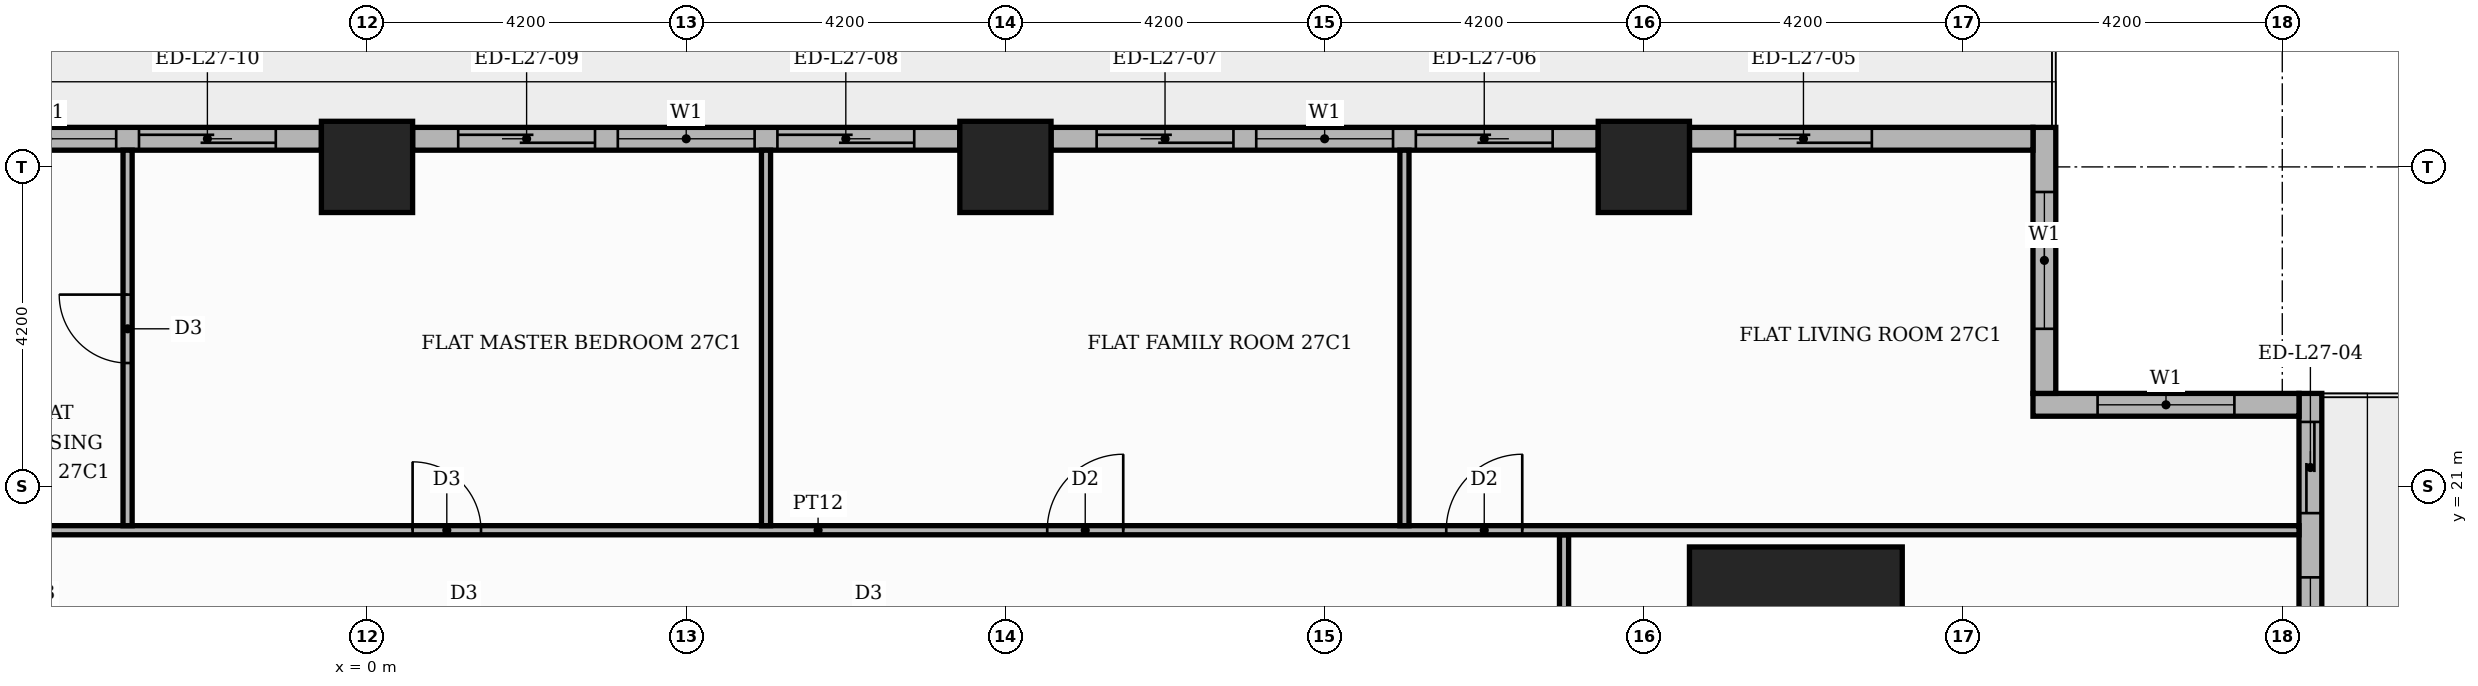
"""IFC4 building model, lengths in metres.
Left out: names, types, materials, properties, quantities, classifications, styles, units other than length and angle.
Written with IfcOpenShell. Run it as: python <this file> out.ifc"""

import sys

from ifc_helpers import new_model, si_unit, direction, frame, frame_2d, origin, origin_2d, place, context, subcontext, project, spatial, rectangle, extrude, element, fill, save


model = new_model("IFC4")
c1 = context("Model", 3, precision=1e-05, world=origin(), true_north=direction((0.0, 1.0)))
c2 = subcontext(c1, "Body", "Model", "MODEL_VIEW")
j1 = project(units=[si_unit("LENGTHUNIT", "METRE"), si_unit("PLANEANGLEUNIT", "RADIAN")], contexts=[c1])
p1 = place(None, origin())
s1 = spatial("IfcSite", under=j1, at=p1, CompositionType="ELEMENT")
p2 = place(p1, origin())
s2 = spatial("IfcBuilding", under=s1, at=p2, CompositionType="ELEMENT")
p3 = place(p2, frame((0.0, 0.0, 114.3)))
s3 = spatial("IfcBuildingStorey", under=s2, at=p3, CompositionType="ELEMENT", Elevation=114.3)
p4 = place(p3, frame((18.8, 18.8, 0.0), z_axis=(0.0, 0.0, 1.0), x_axis=(1.0, 0.0, 0.0)))
e1 = element("IfcColumn", 1, at=p4, inside=s3, PredefinedType="COLUMN", context=c2, shape_type="SweptSolid", body=[
    extrude(rectangle(XDim=2.8, YDim=2.8, at=origin_2d()), origin(), (0.0, 0.0, 1.0), 3.9),
])
for number, where, z_axis, x_axis in (
    (2, (0.0, 25.2, 0.0), (0.0, 0.0, 1.0), (1.0, 0.0, 0.0)),
    (3, (8.4, 25.2, 0.0), (0.0, 0.0, 1.0), (1.0, 0.0, 0.0)),
    (4, (16.8, 25.2, 0.0), (0.0, 0.0, 1.0), (1.0, 0.0, 0.0)),
):
    element("IfcColumn", number, at=place(p3, frame(where, z_axis=z_axis, x_axis=x_axis)), inside=s3, PredefinedType="COLUMN", context=c2, shape_type="SweptSolid", body=[
        extrude(rectangle(XDim=1.2, YDim=1.2, at=origin_2d()), origin(), (0.0, 0.0, 1.0), 3.9),
    ])
p5 = place(p3, frame((25.57, 17.4, 0.0), z_axis=(0.0, 0.0, 1.0), x_axis=(0.0, 1.0, 0.0)))
e5 = element("IfcWall", 5, at=p5, inside=s3, PredefinedType="STANDARD", context=c2, shape_type="SweptSolid", body=[
    extrude(rectangle(XDim=4.82, YDim=0.3, at=frame_2d((2.41, 0.0))), origin(), (0.0, 0.0, 1.0), 3.48),
])
p6 = place(p5, frame((0.6, 0.0, 0.9)))
e6 = element("IfcOpeningElement", 6, at=p6, cuts=e5, PredefinedType="OPENING", context=c2, shape_type="SweptSolid", body=[
    extrude(rectangle(XDim=1.8, YDim=2.1, at=frame_2d((0.9, 1.05))), frame((0.0, 0.16, 0.0), z_axis=(0.0, -1.0, 0.0), x_axis=(1.0, 0.0, 0.0)), (0.0, 0.0, 1.0), 0.32),
])
p7 = place(p5, frame((3.245, 0.0, 0.0)))
e7 = element("IfcOpeningElement", 7, at=p7, cuts=e5, PredefinedType="OPENING", context=c2, shape_type="SweptSolid", body=[
    extrude(rectangle(XDim=1.2, YDim=2.4, at=frame_2d((0.6, 1.2))), frame((0.0, 0.16, 0.0), z_axis=(0.0, -1.0, 0.0), x_axis=(1.0, 0.0, 0.0)), (0.0, 0.0, 1.0), 0.32),
])
p8 = place(p3, frame((25.42, 22.07, 0.0), z_axis=(0.0, 0.0, 1.0), x_axis=(-1.0, 0.0, 0.0)))
e8 = element("IfcWall", 8, at=p8, inside=s3, PredefinedType="STANDARD", context=c2, shape_type="SweptSolid", body=[
    extrude(rectangle(XDim=3.5, YDim=0.3, at=frame_2d((1.75, 0.0))), origin(), (0.0, 0.0, 1.0), 3.48),
])
p9 = place(p8, frame((0.85, 0.0, 0.9)))
e9 = element("IfcOpeningElement", 9, at=p9, cuts=e8, PredefinedType="OPENING", context=c2, shape_type="SweptSolid", body=[
    extrude(rectangle(XDim=1.8, YDim=2.1, at=frame_2d((0.9, 1.05))), frame((0.0, 0.16, 0.0), z_axis=(0.0, -1.0, 0.0), x_axis=(1.0, 0.0, 0.0)), (0.0, 0.0, 1.0), 0.32),
])
p10 = place(p3, frame((22.07, 22.22, 0.0), z_axis=(0.0, 0.0, 1.0), x_axis=(0.0, 1.0, 0.0)))
e10 = element("IfcWall", 10, at=p10, inside=s3, PredefinedType="STANDARD", context=c2, shape_type="SweptSolid", body=[
    extrude(rectangle(XDim=3.5, YDim=0.3, at=frame_2d((1.75, 0.0))), origin(), (0.0, 0.0, 1.0), 3.48),
])
p11 = place(p10, frame((0.85, 0.0, 0.9)))
e11 = element("IfcOpeningElement", 11, at=p11, cuts=e10, PredefinedType="OPENING", context=c2, shape_type="SweptSolid", body=[
    extrude(rectangle(XDim=1.8, YDim=2.1, at=frame_2d((0.9, 1.05))), frame((0.0, 0.16, 0.0), z_axis=(0.0, -1.0, 0.0), x_axis=(1.0, 0.0, 0.0)), (0.0, 0.0, 1.0), 0.32),
])
p12 = place(p3, frame((21.92, 25.57, 0.0), z_axis=(0.0, 0.0, 1.0), x_axis=(-1.0, 0.0, 0.0)))
e12 = element("IfcWall", 12, at=p12, inside=s3, PredefinedType="STANDARD", context=c2, shape_type="SweptSolid", body=[
    extrude(rectangle(XDim=4.52, YDim=0.3, at=frame_2d((2.26, 0.0))), origin(), (0.0, 0.0, 1.0), 3.48),
])
p13 = place(p12, frame((2.12, 0.0, 0.0)))
e13 = element("IfcOpeningElement", 13, at=p13, cuts=e12, PredefinedType="OPENING", context=c2, shape_type="SweptSolid", body=[
    extrude(rectangle(XDim=1.8, YDim=2.4, at=frame_2d((0.9, 1.2))), frame((0.0, 0.16, 0.0), z_axis=(0.0, -1.0, 0.0), x_axis=(1.0, 0.0, 0.0)), (0.0, 0.0, 1.0), 0.32),
])
p14 = place(p3, frame((16.2, 25.57, 0.0), z_axis=(0.0, 0.0, 1.0), x_axis=(-1.0, 0.0, 0.0)))
e14 = element("IfcWall", 14, at=p14, inside=s3, PredefinedType="STANDARD", context=c2, shape_type="SweptSolid", body=[
    extrude(rectangle(XDim=7.2, YDim=0.3, at=frame_2d((3.6, 0.0))), origin(), (0.0, 0.0, 1.0), 3.48),
])
p15 = place(p14, frame((0.6, 0.0, 0.0)))
e15 = element("IfcOpeningElement", 15, at=p15, cuts=e14, PredefinedType="OPENING", context=c2, shape_type="SweptSolid", body=[
    extrude(rectangle(XDim=1.8, YDim=2.4, at=frame_2d((0.9, 1.2))), frame((0.0, 0.16, 0.0), z_axis=(0.0, -1.0, 0.0), x_axis=(1.0, 0.0, 0.0)), (0.0, 0.0, 1.0), 0.32),
])
p16 = place(p14, frame((2.7, 0.0, 0.9)))
e16 = element("IfcOpeningElement", 16, at=p16, cuts=e14, PredefinedType="OPENING", context=c2, shape_type="SweptSolid", body=[
    extrude(rectangle(XDim=1.8, YDim=2.1, at=frame_2d((0.9, 1.05))), frame((0.0, 0.16, 0.0), z_axis=(0.0, -1.0, 0.0), x_axis=(1.0, 0.0, 0.0)), (0.0, 0.0, 1.0), 0.32),
])
p17 = place(p14, frame((4.8, 0.0, 0.0)))
e17 = element("IfcOpeningElement", 17, at=p17, cuts=e14, PredefinedType="OPENING", context=c2, shape_type="SweptSolid", body=[
    extrude(rectangle(XDim=1.8, YDim=2.4, at=frame_2d((0.9, 1.2))), frame((0.0, 0.16, 0.0), z_axis=(0.0, -1.0, 0.0), x_axis=(1.0, 0.0, 0.0)), (0.0, 0.0, 1.0), 0.32),
])
p18 = place(p3, frame((7.8, 25.57, 0.0), z_axis=(0.0, 0.0, 1.0), x_axis=(-1.0, 0.0, 0.0)))
e18 = element("IfcWall", 18, at=p18, inside=s3, PredefinedType="STANDARD", context=c2, shape_type="SweptSolid", body=[
    extrude(rectangle(XDim=7.2, YDim=0.3, at=frame_2d((3.6, 0.0))), origin(), (0.0, 0.0, 1.0), 3.48),
])
p19 = place(p18, frame((0.6, 0.0, 0.0)))
e19 = element("IfcOpeningElement", 19, at=p19, cuts=e18, PredefinedType="OPENING", context=c2, shape_type="SweptSolid", body=[
    extrude(rectangle(XDim=1.8, YDim=2.4, at=frame_2d((0.9, 1.2))), frame((0.0, 0.16, 0.0), z_axis=(0.0, -1.0, 0.0), x_axis=(1.0, 0.0, 0.0)), (0.0, 0.0, 1.0), 0.32),
])
p20 = place(p18, frame((2.7, 0.0, 0.9)))
e20 = element("IfcOpeningElement", 20, at=p20, cuts=e18, PredefinedType="OPENING", context=c2, shape_type="SweptSolid", body=[
    extrude(rectangle(XDim=1.8, YDim=2.1, at=frame_2d((0.9, 1.05))), frame((0.0, 0.16, 0.0), z_axis=(0.0, -1.0, 0.0), x_axis=(1.0, 0.0, 0.0)), (0.0, 0.0, 1.0), 0.32),
])
p21 = place(p18, frame((4.8, 0.0, 0.0)))
e21 = element("IfcOpeningElement", 21, at=p21, cuts=e18, PredefinedType="OPENING", context=c2, shape_type="SweptSolid", body=[
    extrude(rectangle(XDim=1.8, YDim=2.4, at=frame_2d((0.9, 1.2))), frame((0.0, 0.16, 0.0), z_axis=(0.0, -1.0, 0.0), x_axis=(1.0, 0.0, 0.0)), (0.0, 0.0, 1.0), 0.32),
])
p22 = place(p3, frame((-0.6, 25.57, 0.0), z_axis=(0.0, 0.0, 1.0), x_axis=(-1.0, 0.0, 0.0)))
e22 = element("IfcWall", 22, at=p22, inside=s3, PredefinedType="STANDARD", context=c2, shape_type="SweptSolid", body=[
    extrude(rectangle(XDim=7.2, YDim=0.3, at=frame_2d((3.6, 0.0))), origin(), (0.0, 0.0, 1.0), 3.48),
])
p23 = place(p22, frame((0.6, 0.0, 0.0)))
e23 = element("IfcOpeningElement", 23, at=p23, cuts=e22, PredefinedType="OPENING", context=c2, shape_type="SweptSolid", body=[
    extrude(rectangle(XDim=1.8, YDim=2.4, at=frame_2d((0.9, 1.2))), frame((0.0, 0.16, 0.0), z_axis=(0.0, -1.0, 0.0), x_axis=(1.0, 0.0, 0.0)), (0.0, 0.0, 1.0), 0.32),
])
p24 = place(p22, frame((2.7, 0.0, 0.9)))
e24 = element("IfcOpeningElement", 24, at=p24, cuts=e22, PredefinedType="OPENING", context=c2, shape_type="SweptSolid", body=[
    extrude(rectangle(XDim=1.8, YDim=2.1, at=frame_2d((0.9, 1.05))), frame((0.0, 0.16, 0.0), z_axis=(0.0, -1.0, 0.0), x_axis=(1.0, 0.0, 0.0)), (0.0, 0.0, 1.0), 0.32),
])
p25 = place(p22, frame((4.8, 0.0, 0.9)))
e25 = element("IfcOpeningElement", 25, at=p25, cuts=e22, PredefinedType="OPENING", context=c2, shape_type="SweptSolid", body=[
    extrude(rectangle(XDim=1.8, YDim=2.1, at=frame_2d((0.9, 1.05))), frame((0.0, 0.16, 0.0), z_axis=(0.0, -1.0, 0.0), x_axis=(1.0, 0.0, 0.0)), (0.0, 0.0, 1.0), 0.32),
])
p26 = place(p3, frame((15.75, 13.75, 0.0), z_axis=(0.0, 0.0, 1.0), x_axis=(0.0, 1.0, 0.0)))
e26 = element("IfcWall", 26, at=p26, inside=s3, PredefinedType="PARTITIONING", context=c2, shape_type="SweptSolid", body=[
    extrude(rectangle(XDim=6.61, YDim=0.12, at=frame_2d((3.305, 0.0))), origin(), (0.0, 0.0, 1.0), 3.48),
])
p27 = place(p26, frame((2.835, 0.0, 0.0)))
e27 = element("IfcOpeningElement", 27, at=p27, cuts=e26, PredefinedType="OPENING", context=c2, shape_type="SweptSolid", body=[
    extrude(rectangle(XDim=0.9, YDim=2.1, at=frame_2d((0.45, 1.05))), frame((0.0, 0.07, 0.0), z_axis=(0.0, -1.0, 0.0), x_axis=(1.0, 0.0, 0.0)), (0.0, 0.0, 1.0), 0.14),
])
p28 = place(p3, frame((-13.55, 20.42, 0.0), z_axis=(0.0, 0.0, 1.0), x_axis=(1.0, 0.0, 0.0)))
e28 = element("IfcWall", 28, at=p28, inside=s3, PredefinedType="PARTITIONING", context=c2, shape_type="SweptSolid", body=[
    extrude(rectangle(XDim=38.97, YDim=0.12, at=frame_2d((19.485, 0.0))), origin(), (0.0, 0.0, 1.0), 3.48),
])
p29 = place(p28, frame((27.75, 0.0, 0.0)))
e29 = element("IfcOpeningElement", 29, at=p29, cuts=e28, PredefinedType="OPENING", context=c2, shape_type="SweptSolid", body=[
    extrude(rectangle(XDim=1.0, YDim=2.1, at=frame_2d((0.5, 1.05))), frame((0.0, 0.07, 0.0), z_axis=(0.0, -1.0, 0.0), x_axis=(1.0, 0.0, 0.0)), (0.0, 0.0, 1.0), 0.14),
])
p30 = place(p28, frame((22.5, 0.0, 0.0)))
e30 = element("IfcOpeningElement", 30, at=p30, cuts=e28, PredefinedType="OPENING", context=c2, shape_type="SweptSolid", body=[
    extrude(rectangle(XDim=1.0, YDim=2.1, at=frame_2d((0.5, 1.05))), frame((0.0, 0.07, 0.0), z_axis=(0.0, -1.0, 0.0), x_axis=(1.0, 0.0, 0.0)), (0.0, 0.0, 1.0), 0.14),
])
p31 = place(p28, frame((14.15, 0.0, 0.0)))
e31 = element("IfcOpeningElement", 31, at=p31, cuts=e28, PredefinedType="OPENING", context=c2, shape_type="SweptSolid", body=[
    extrude(rectangle(XDim=0.9, YDim=2.1, at=frame_2d((0.45, 1.05))), frame((0.0, 0.07, 0.0), z_axis=(0.0, -1.0, 0.0), x_axis=(1.0, 0.0, 0.0)), (0.0, 0.0, 1.0), 0.14),
])
p32 = place(p28, frame((3.65, 0.0, 0.0)))
e32 = element("IfcOpeningElement", 32, at=p32, cuts=e28, PredefinedType="OPENING", context=c2, shape_type="SweptSolid", body=[
    extrude(rectangle(XDim=0.9, YDim=2.1, at=frame_2d((0.45, 1.05))), frame((0.0, 0.07, 0.0), z_axis=(0.0, -1.0, 0.0), x_axis=(1.0, 0.0, 0.0)), (0.0, 0.0, 1.0), 0.14),
])
p33 = place(p3, frame((-3.15, 20.48, 0.0), z_axis=(0.0, 0.0, 1.0), x_axis=(0.0, 1.0, 0.0)))
e33 = element("IfcWall", 33, at=p33, inside=s3, PredefinedType="PARTITIONING", context=c2, shape_type="SweptSolid", body=[
    extrude(rectangle(XDim=4.94, YDim=0.12, at=frame_2d((2.47, 0.0))), origin(), (0.0, 0.0, 1.0), 3.48),
])
p34 = place(p33, frame((2.14, 0.0, 0.0)))
e34 = element("IfcOpeningElement", 34, at=p34, cuts=e33, PredefinedType="OPENING", context=c2, shape_type="SweptSolid", body=[
    extrude(rectangle(XDim=0.9, YDim=2.1, at=frame_2d((0.45, 1.05))), frame((0.0, 0.07, 0.0), z_axis=(0.0, -1.0, 0.0), x_axis=(1.0, 0.0, 0.0)), (0.0, 0.0, 1.0), 0.14),
])
for number, where, z_axis, x_axis in (
    (35, (5.25, 20.48, 0.0), (0.0, 0.0, 1.0), (0.0, 1.0, 0.0)),
    (36, (13.65, 20.48, 0.0), (0.0, 0.0, 1.0), (0.0, 1.0, 0.0)),
):
    element("IfcWall", number, at=place(p3, frame(where, z_axis=z_axis, x_axis=x_axis)), inside=s3, PredefinedType="PARTITIONING", context=c2, shape_type="SweptSolid", body=[
        extrude(rectangle(XDim=4.94, YDim=0.12, at=frame_2d((2.47, 0.0))), origin(), (0.0, 0.0, 1.0), 3.48),
    ])
p35 = place(p6, origin())
e37 = element("IfcWindow", 37, at=p35, inside=s3, PartitioningType="SINGLE_PANEL", PredefinedType="WINDOW", context=c2, shape_type="SweptSolid", body=[
    extrude(rectangle(XDim=1.8, YDim=2.1, at=frame_2d((0.9, 1.05))), frame((0.0, 0.03, 0.0), z_axis=(0.0, -1.0, 0.0), x_axis=(1.0, 0.0, 0.0)), (0.0, 0.0, 1.0), 0.06),
])
fill(e6, e37)
p36 = place(p7, origin())
e38 = element("IfcDoor", 38, at=p36, inside=s3, OperationType="SLIDING_TO_RIGHT", PredefinedType="DOOR", context=c2, shape_type="SweptSolid", body=[
    extrude(rectangle(XDim=1.2, YDim=2.4, at=frame_2d((0.6, 1.2))), frame((0.0, 0.025, 0.0), z_axis=(0.0, -1.0, 0.0), x_axis=(1.0, 0.0, 0.0)), (0.0, 0.0, 1.0), 0.05),
])
fill(e7, e38)
p37 = place(p9, origin())
e39 = element("IfcWindow", 39, at=p37, inside=s3, PartitioningType="SINGLE_PANEL", PredefinedType="WINDOW", context=c2, shape_type="SweptSolid", body=[
    extrude(rectangle(XDim=1.8, YDim=2.1, at=frame_2d((0.9, 1.05))), frame((0.0, 0.03, 0.0), z_axis=(0.0, -1.0, 0.0), x_axis=(1.0, 0.0, 0.0)), (0.0, 0.0, 1.0), 0.06),
])
fill(e9, e39)
p38 = place(p11, origin())
e40 = element("IfcWindow", 40, at=p38, inside=s3, PartitioningType="SINGLE_PANEL", PredefinedType="WINDOW", context=c2, shape_type="SweptSolid", body=[
    extrude(rectangle(XDim=1.8, YDim=2.1, at=frame_2d((0.9, 1.05))), frame((0.0, 0.03, 0.0), z_axis=(0.0, -1.0, 0.0), x_axis=(1.0, 0.0, 0.0)), (0.0, 0.0, 1.0), 0.06),
])
fill(e11, e40)
p39 = place(p13, origin())
e41 = element("IfcDoor", 41, at=p39, inside=s3, OperationType="SLIDING_TO_RIGHT", PredefinedType="DOOR", context=c2, shape_type="SweptSolid", body=[
    extrude(rectangle(XDim=1.8, YDim=2.4, at=frame_2d((0.9, 1.2))), frame((0.0, 0.025, 0.0), z_axis=(0.0, -1.0, 0.0), x_axis=(1.0, 0.0, 0.0)), (0.0, 0.0, 1.0), 0.05),
])
fill(e13, e41)
p40 = place(p15, origin())
e42 = element("IfcDoor", 42, at=p40, inside=s3, OperationType="SLIDING_TO_LEFT", PredefinedType="DOOR", context=c2, shape_type="SweptSolid", body=[
    extrude(rectangle(XDim=1.8, YDim=2.4, at=frame_2d((0.9, 1.2))), frame((0.0, 0.025, 0.0), z_axis=(0.0, -1.0, 0.0), x_axis=(1.0, 0.0, 0.0)), (0.0, 0.0, 1.0), 0.05),
])
fill(e15, e42)
p41 = place(p16, origin())
e43 = element("IfcWindow", 43, at=p41, inside=s3, PartitioningType="SINGLE_PANEL", PredefinedType="WINDOW", context=c2, shape_type="SweptSolid", body=[
    extrude(rectangle(XDim=1.8, YDim=2.1, at=frame_2d((0.9, 1.05))), frame((0.0, 0.03, 0.0), z_axis=(0.0, -1.0, 0.0), x_axis=(1.0, 0.0, 0.0)), (0.0, 0.0, 1.0), 0.06),
])
fill(e16, e43)
p42 = place(p17, origin())
e44 = element("IfcDoor", 44, at=p42, inside=s3, OperationType="SLIDING_TO_RIGHT", PredefinedType="DOOR", context=c2, shape_type="SweptSolid", body=[
    extrude(rectangle(XDim=1.8, YDim=2.4, at=frame_2d((0.9, 1.2))), frame((0.0, 0.025, 0.0), z_axis=(0.0, -1.0, 0.0), x_axis=(1.0, 0.0, 0.0)), (0.0, 0.0, 1.0), 0.05),
])
fill(e17, e44)
p43 = place(p19, origin())
e45 = element("IfcDoor", 45, at=p43, inside=s3, OperationType="SLIDING_TO_LEFT", PredefinedType="DOOR", context=c2, shape_type="SweptSolid", body=[
    extrude(rectangle(XDim=1.8, YDim=2.4, at=frame_2d((0.9, 1.2))), frame((0.0, 0.025, 0.0), z_axis=(0.0, -1.0, 0.0), x_axis=(1.0, 0.0, 0.0)), (0.0, 0.0, 1.0), 0.05),
])
fill(e19, e45)
p44 = place(p20, origin())
e46 = element("IfcWindow", 46, at=p44, inside=s3, PartitioningType="SINGLE_PANEL", PredefinedType="WINDOW", context=c2, shape_type="SweptSolid", body=[
    extrude(rectangle(XDim=1.8, YDim=2.1, at=frame_2d((0.9, 1.05))), frame((0.0, 0.03, 0.0), z_axis=(0.0, -1.0, 0.0), x_axis=(1.0, 0.0, 0.0)), (0.0, 0.0, 1.0), 0.06),
])
fill(e20, e46)
p45 = place(p21, origin())
e47 = element("IfcDoor", 47, at=p45, inside=s3, OperationType="SLIDING_TO_RIGHT", PredefinedType="DOOR", context=c2, shape_type="SweptSolid", body=[
    extrude(rectangle(XDim=1.8, YDim=2.4, at=frame_2d((0.9, 1.2))), frame((0.0, 0.025, 0.0), z_axis=(0.0, -1.0, 0.0), x_axis=(1.0, 0.0, 0.0)), (0.0, 0.0, 1.0), 0.05),
])
fill(e21, e47)
p46 = place(p23, origin())
e48 = element("IfcDoor", 48, at=p46, inside=s3, OperationType="SLIDING_TO_LEFT", PredefinedType="DOOR", context=c2, shape_type="SweptSolid", body=[
    extrude(rectangle(XDim=1.8, YDim=2.4, at=frame_2d((0.9, 1.2))), frame((0.0, 0.025, 0.0), z_axis=(0.0, -1.0, 0.0), x_axis=(1.0, 0.0, 0.0)), (0.0, 0.0, 1.0), 0.05),
])
fill(e23, e48)
p47 = place(p24, origin())
e49 = element("IfcWindow", 49, at=p47, inside=s3, PartitioningType="SINGLE_PANEL", PredefinedType="WINDOW", context=c2, shape_type="SweptSolid", body=[
    extrude(rectangle(XDim=1.8, YDim=2.1, at=frame_2d((0.9, 1.05))), frame((0.0, 0.03, 0.0), z_axis=(0.0, -1.0, 0.0), x_axis=(1.0, 0.0, 0.0)), (0.0, 0.0, 1.0), 0.06),
])
fill(e24, e49)
p48 = place(p29, origin())
e50 = element("IfcDoor", 50, at=p48, inside=s3, OperationType="SINGLE_SWING_RIGHT", PredefinedType="DOOR", context=c2, shape_type="SweptSolid", body=[
    extrude(rectangle(XDim=1.0, YDim=2.1, at=frame_2d((0.5, 1.05))), frame((0.0, 0.025, 0.0), z_axis=(0.0, -1.0, 0.0), x_axis=(1.0, 0.0, 0.0)), (0.0, 0.0, 1.0), 0.05),
])
fill(e29, e50)
p49 = place(p30, origin())
e51 = element("IfcDoor", 51, at=p49, inside=s3, OperationType="SINGLE_SWING_RIGHT", PredefinedType="DOOR", context=c2, shape_type="SweptSolid", body=[
    extrude(rectangle(XDim=1.0, YDim=2.1, at=frame_2d((0.5, 1.05))), frame((0.0, 0.025, 0.0), z_axis=(0.0, -1.0, 0.0), x_axis=(1.0, 0.0, 0.0)), (0.0, 0.0, 1.0), 0.05),
])
fill(e30, e51)
p50 = place(p31, origin())
e52 = element("IfcDoor", 52, at=p50, inside=s3, OperationType="SINGLE_SWING_LEFT", PredefinedType="DOOR", context=c2, shape_type="SweptSolid", body=[
    extrude(rectangle(XDim=0.9, YDim=2.1, at=frame_2d((0.45, 1.05))), frame((0.0, 0.025, 0.0), z_axis=(0.0, -1.0, 0.0), x_axis=(1.0, 0.0, 0.0)), (0.0, 0.0, 1.0), 0.05),
])
fill(e31, e52)
p51 = place(p34, origin())
e53 = element("IfcDoor", 53, at=p51, inside=s3, OperationType="SINGLE_SWING_RIGHT", PredefinedType="DOOR", context=c2, shape_type="SweptSolid", body=[
    extrude(rectangle(XDim=0.9, YDim=2.1, at=frame_2d((0.45, 1.05))), frame((0.0, 0.025, 0.0), z_axis=(0.0, -1.0, 0.0), x_axis=(1.0, 0.0, 0.0)), (0.0, 0.0, 1.0), 0.05),
])
fill(e34, e53)
save(model, sys.argv[1])
